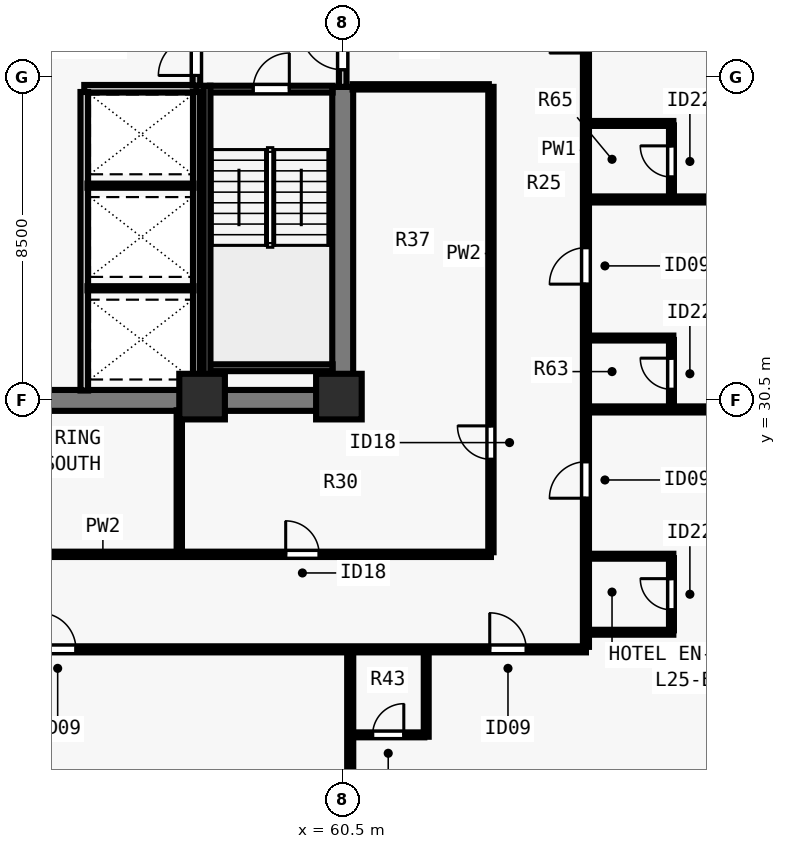
"""IFC4 building model, lengths in metres.
Left out: names, types, materials, properties, quantities, classifications, styles, units other than length and angle.
Written with IfcOpenShell. Run it as: python <this file> out.ifc"""

import sys

from ifc_helpers import new_model, si_unit, direction, frame, frame_2d, origin, origin_2d, place, context, subcontext, project, spatial, rectangle, extrude, element, fill, save


model = new_model("IFC4")
c1 = context("Model", 3, precision=1e-05, world=origin(), true_north=direction((0.0, 1.0)))
c2 = subcontext(c1, "Body", "Model", "MODEL_VIEW")
j1 = project(units=[si_unit("LENGTHUNIT", "METRE"), si_unit("PLANEANGLEUNIT", "RADIAN")], contexts=[c1])
p1 = place(None, origin())
s1 = spatial("IfcSite", under=j1, at=p1, CompositionType="ELEMENT")
p2 = place(p1, origin())
s2 = spatial("IfcBuilding", under=s1, at=p2, CompositionType="ELEMENT")
p3 = place(p2, frame((0.0, 0.0, 93.5)))
s3 = spatial("IfcBuildingStorey", under=s2, at=p3, CompositionType="ELEMENT", Elevation=93.5)
for number, where, z_axis, x_axis in (
    (1, (56.8, 30.6, 0.0), (0.0, 0.0, 1.0), (1.0, 0.0, 0.0)),
    (2, (60.4, 30.6, 0.0), (0.0, 0.0, 1.0), (1.0, 0.0, 0.0)),
):
    element("IfcColumn", number, at=place(p3, frame(where, z_axis=z_axis, x_axis=x_axis)), inside=s3, PredefinedType="COLUMN", context=c2, shape_type="SweptSolid", body=[
        extrude(rectangle(XDim=1.2, YDim=1.2, at=origin_2d()), origin(), (0.0, 0.0, 1.0), 3.5),
    ])
p4 = place(p3, frame((43.225, 30.5, 0.0), z_axis=(0.0, 0.0, 1.0), x_axis=(1.0, 0.0, 0.0)))
e3 = element("IfcWall", 3, at=p4, inside=s3, PredefinedType="SHEAR", context=c2, shape_type="SweptSolid", body=[
    extrude(rectangle(XDim=17.55, YDim=0.55, at=frame_2d((8.775, 0.0))), origin(), (0.0, 0.0, 1.0), 3.24),
])
p5 = place(p3, frame((60.5, 30.765, 0.0), z_axis=(0.0, 0.0, 1.0), x_axis=(0.0, 1.0, 0.0)))
e4 = element("IfcWall", 4, at=p5, inside=s3, PredefinedType="SHEAR", context=c2, shape_type="SweptSolid", body=[
    extrude(rectangle(XDim=7.985, YDim=0.55, at=frame_2d((3.993, 0.0))), origin(), (0.0, 0.0, 1.0), 3.24),
])
p6 = place(p3, frame((53.7, 38.7, 0.0), z_axis=(0.0, 0.0, 1.0), x_axis=(1.0, 0.0, 0.0)))
e5 = element("IfcWall", 5, at=p6, inside=s3, PredefinedType="SOLIDWALL", context=c2, shape_type="SweptSolid", body=[
    extrude(rectangle(XDim=2.95, YDim=0.2, at=frame_2d((1.475, 0.0))), origin(), (0.0, 0.0, 1.0), 3.24),
])
p7 = place(p3, frame((53.7, 30.76, 0.0), z_axis=(0.0, 0.0, 1.0), x_axis=(0.0, 1.0, 0.0)))
e6 = element("IfcWall", 6, at=p7, inside=s3, PredefinedType="SOLIDWALL", context=c2, shape_type="SweptSolid", body=[
    extrude(rectangle(XDim=7.855, YDim=0.2, at=frame_2d((3.927, 0.0))), origin(), (0.0, 0.0, 1.0), 3.24),
])
p8 = place(p3, frame((60.5, 38.75, 0.0), z_axis=(0.0, 0.0, 1.0), x_axis=(0.0, 1.0, 0.0)))
e7 = element("IfcWall", 7, at=p8, inside=s3, PredefinedType="SOLIDWALL", context=c2, shape_type="SweptSolid", body=[
    extrude(rectangle(XDim=2.05, YDim=0.2, at=frame_2d((1.025, 0.0))), origin(), (0.0, 0.0, 1.0), 3.24),
])
p9 = place(p8, frame((0.45, 0.0, 0.0)))
e8 = element("IfcOpeningElement", 8, at=p9, cuts=e7, PredefinedType="OPENING", context=c2, shape_type="SweptSolid", body=[
    extrude(rectangle(XDim=1.1, YDim=2.15, at=frame_2d((0.55, 1.075))), frame((0.0, 0.11, 0.0), z_axis=(0.0, -1.0, 0.0), x_axis=(1.0, 0.0, 0.0)), (0.0, 0.0, 1.0), 0.22),
])
p10 = place(p3, frame((56.65, 38.785, 0.0), z_axis=(0.0, 0.0, 1.0), x_axis=(0.0, 1.0, 0.0)))
e9 = element("IfcWall", 9, at=p10, inside=s3, PredefinedType="SOLIDWALL", context=c2, shape_type="SweptSolid", body=[
    extrude(rectangle(XDim=4.865, YDim=0.2, at=frame_2d((2.433, 0.0))), origin(), (0.0, 0.0, 1.0), 3.24),
])
p11 = place(p10, frame((0.265, 0.0, 0.0)))
e10 = element("IfcOpeningElement", 10, at=p11, cuts=e9, PredefinedType="OPENING", context=c2, shape_type="SweptSolid", body=[
    extrude(rectangle(XDim=1.0, YDim=2.15, at=frame_2d((0.5, 1.075))), frame((0.0, 0.11, 0.0), z_axis=(0.0, -1.0, 0.0), x_axis=(1.0, 0.0, 0.0)), (0.0, 0.0, 1.0), 0.22),
])
p12 = place(p3, frame((56.65, 30.76, 0.0), z_axis=(0.0, 0.0, 1.0), x_axis=(0.0, 1.0, 0.0)))
e11 = element("IfcWall", 11, at=p12, inside=s3, PredefinedType="SOLIDWALL", context=c2, shape_type="SweptSolid", body=[
    extrude(rectangle(XDim=7.855, YDim=0.18, at=frame_2d((3.927, 0.0))), origin(), (0.0, 0.0, 1.0), 3.24),
])
for number, where, z_axis, x_axis in (
    (12, (53.785, 33.45, 0.0), (0.0, 0.0, 1.0), (1.0, 0.0, 0.0)),
    (13, (53.785, 36.15, 0.0), (0.0, 0.0, 1.0), (1.0, 0.0, 0.0)),
):
    element("IfcWall", number, at=place(p3, frame(where, z_axis=z_axis, x_axis=x_axis)), inside=s3, PredefinedType="PARTITIONING", context=c2, shape_type="SweptSolid", body=[
        extrude(rectangle(XDim=2.79, YDim=0.11, at=frame_2d((1.395, 0.0))), origin(), (0.0, 0.0, 1.0), 3.24),
    ])
p13 = place(p3, frame((37.1, 23.95, 0.0), z_axis=(0.0, 0.0, 1.0), x_axis=(1.0, 0.0, 0.0)))
e14 = element("IfcWall", 14, at=p13, inside=s3, PredefinedType="PARTITIONING", context=c2, shape_type="SweptSolid", body=[
    extrude(rectangle(XDim=29.8, YDim=0.16, at=frame_2d((14.9, 0.0))), origin(), (0.0, 0.0, 1.0), 3.24),
])
p14 = place(p13, frame((2.571, 0.0, 0.0)))
e15 = element("IfcOpeningElement", 15, at=p14, cuts=e14, PredefinedType="OPENING", context=c2, shape_type="SweptSolid", body=[
    extrude(rectangle(XDim=0.96, YDim=2.15, at=frame_2d((0.48, 1.075))), frame((0.0, 0.09, 0.0), z_axis=(0.0, -1.0, 0.0), x_axis=(1.0, 0.0, 0.0)), (0.0, 0.0, 1.0), 0.18),
])
p15 = place(p13, frame((15.42, 0.0, 0.0)))
e16 = element("IfcOpeningElement", 16, at=p15, cuts=e14, PredefinedType="OPENING", context=c2, shape_type="SweptSolid", body=[
    extrude(rectangle(XDim=0.96, YDim=2.15, at=frame_2d((0.48, 1.075))), frame((0.0, 0.09, 0.0), z_axis=(0.0, -1.0, 0.0), x_axis=(1.0, 0.0, 0.0)), (0.0, 0.0, 1.0), 0.18),
])
p16 = place(p13, frame((27.269, 0.0, 0.0)))
e17 = element("IfcOpeningElement", 17, at=p16, cuts=e14, PredefinedType="OPENING", context=c2, shape_type="SweptSolid", body=[
    extrude(rectangle(XDim=0.96, YDim=2.15, at=frame_2d((0.48, 1.075))), frame((0.0, 0.09, 0.0), z_axis=(0.0, -1.0, 0.0), x_axis=(1.0, 0.0, 0.0)), (0.0, 0.0, 1.0), 0.18),
])
p17 = place(p3, frame((66.9, 24.015, 0.0), z_axis=(0.0, 0.0, 1.0), x_axis=(0.0, 1.0, 0.0)))
e18 = element("IfcWall", 18, at=p17, inside=s3, PredefinedType="PARTITIONING", context=c2, shape_type="SweptSolid", body=[
    extrude(rectangle(XDim=29.97, YDim=0.16, at=frame_2d((14.985, 0.0))), origin(), (0.0, 0.0, 1.0), 3.24),
])
p18 = place(p17, frame((3.911, 0.0, 0.0)))
e19 = element("IfcOpeningElement", 19, at=p18, cuts=e18, PredefinedType="OPENING", context=c2, shape_type="SweptSolid", body=[
    extrude(rectangle(XDim=0.96, YDim=2.15, at=frame_2d((0.48, 1.075))), frame((0.0, 0.09, 0.0), z_axis=(0.0, -1.0, 0.0), x_axis=(1.0, 0.0, 0.0)), (0.0, 0.0, 1.0), 0.18),
])
p19 = place(p17, frame((9.544, 0.0, 0.0)))
e20 = element("IfcOpeningElement", 20, at=p19, cuts=e18, PredefinedType="OPENING", context=c2, shape_type="SweptSolid", body=[
    extrude(rectangle(XDim=0.96, YDim=2.15, at=frame_2d((0.48, 1.075))), frame((0.0, 0.09, 0.0), z_axis=(0.0, -1.0, 0.0), x_axis=(1.0, 0.0, 0.0)), (0.0, 0.0, 1.0), 0.18),
])
p20 = place(p17, frame((15.625, 0.0, 0.0)))
e21 = element("IfcOpeningElement", 21, at=p20, cuts=e18, PredefinedType="OPENING", context=c2, shape_type="SweptSolid", body=[
    extrude(rectangle(XDim=0.96, YDim=2.15, at=frame_2d((0.48, 1.075))), frame((0.0, 0.09, 0.0), z_axis=(0.0, -1.0, 0.0), x_axis=(1.0, 0.0, 0.0)), (0.0, 0.0, 1.0), 0.18),
])
p21 = place(p17, frame((21.584, 0.0, 0.0)))
e22 = element("IfcOpeningElement", 22, at=p21, cuts=e18, PredefinedType="OPENING", context=c2, shape_type="SweptSolid", body=[
    extrude(rectangle(XDim=0.96, YDim=2.15, at=frame_2d((0.48, 1.075))), frame((0.0, 0.09, 0.0), z_axis=(0.0, -1.0, 0.0), x_axis=(1.0, 0.0, 0.0)), (0.0, 0.0, 1.0), 0.18),
])
p22 = place(p17, frame((27.494, 0.0, 0.0)))
e23 = element("IfcOpeningElement", 23, at=p22, cuts=e18, PredefinedType="OPENING", context=c2, shape_type="SweptSolid", body=[
    extrude(rectangle(XDim=0.96, YDim=2.15, at=frame_2d((0.48, 1.075))), frame((0.0, 0.09, 0.0), z_axis=(0.0, -1.0, 0.0), x_axis=(1.0, 0.0, 0.0)), (0.0, 0.0, 1.0), 0.18),
])
p23 = place(p3, frame((39.6, 26.45, 0.0), z_axis=(0.0, 0.0, 1.0), x_axis=(1.0, 0.0, 0.0)))
e24 = element("IfcWall", 24, at=p23, inside=s3, PredefinedType="PARTITIONING", context=c2, shape_type="SweptSolid", body=[
    extrude(rectangle(XDim=24.8, YDim=0.14, at=frame_2d((12.4, 0.0))), origin(), (0.0, 0.0, 1.0), 3.24),
])
p24 = place(p23, frame((1.2, 0.0, 0.0)))
e25 = element("IfcOpeningElement", 25, at=p24, cuts=e24, PredefinedType="OPENING", context=c2, shape_type="SweptSolid", body=[
    extrude(rectangle(XDim=0.88, YDim=2.1, at=frame_2d((0.44, 1.05))), frame((0.0, 0.08, 0.0), z_axis=(0.0, -1.0, 0.0), x_axis=(1.0, 0.0, 0.0)), (0.0, 0.0, 1.0), 0.16),
])
p25 = place(p23, frame((8.9, 0.0, 0.0)))
e26 = element("IfcOpeningElement", 26, at=p25, cuts=e24, PredefinedType="OPENING", context=c2, shape_type="SweptSolid", body=[
    extrude(rectangle(XDim=0.88, YDim=2.1, at=frame_2d((0.44, 1.05))), frame((0.0, 0.08, 0.0), z_axis=(0.0, -1.0, 0.0), x_axis=(1.0, 0.0, 0.0)), (0.0, 0.0, 1.0), 0.16),
])
p26 = place(p23, frame((19.4, 0.0, 0.0)))
e27 = element("IfcOpeningElement", 27, at=p26, cuts=e24, PredefinedType="OPENING", context=c2, shape_type="SweptSolid", body=[
    extrude(rectangle(XDim=0.88, YDim=2.1, at=frame_2d((0.44, 1.05))), frame((0.0, 0.08, 0.0), z_axis=(0.0, -1.0, 0.0), x_axis=(1.0, 0.0, 0.0)), (0.0, 0.0, 1.0), 0.16),
])
p27 = place(p3, frame((64.4, 26.505, 0.0), z_axis=(0.0, 0.0, 1.0), x_axis=(0.0, 1.0, 0.0)))
e28 = element("IfcWall", 28, at=p27, inside=s3, PredefinedType="PARTITIONING", context=c2, shape_type="SweptSolid", body=[
    extrude(rectangle(XDim=12.245, YDim=0.14, at=frame_2d((6.123, 0.0))), origin(), (0.0, 0.0, 1.0), 3.24),
])
p28 = place(p27, frame((2.445, 0.0, 0.0)))
e29 = element("IfcOpeningElement", 29, at=p28, cuts=e28, PredefinedType="OPENING", context=c2, shape_type="SweptSolid", body=[
    extrude(rectangle(XDim=0.88, YDim=2.1, at=frame_2d((0.44, 1.05))), frame((0.0, 0.08, 0.0), z_axis=(0.0, -1.0, 0.0), x_axis=(1.0, 0.0, 0.0)), (0.0, 0.0, 1.0), 0.16),
])
p29 = place(p3, frame((60.76, 38.75, 0.0), z_axis=(0.0, 0.0, 1.0), x_axis=(1.0, 0.0, 0.0)))
e30 = element("IfcWall", 30, at=p29, inside=s3, PredefinedType="PARTITIONING", context=c2, shape_type="SweptSolid", body=[
    extrude(rectangle(XDim=3.585, YDim=0.14, at=frame_2d((1.792, 0.0))), origin(), (0.0, 0.0, 1.0), 3.24),
])
p30 = place(p3, frame((56.2, 26.505, 0.0), z_axis=(0.0, 0.0, 1.0), x_axis=(0.0, 1.0, 0.0)))
e31 = element("IfcWall", 31, at=p30, inside=s3, PredefinedType="PARTITIONING", context=c2, shape_type="SweptSolid", body=[
    extrude(rectangle(XDim=3.735, YDim=0.14, at=frame_2d((1.868, 0.0))), origin(), (0.0, 0.0, 1.0), 2.809),
])
p31 = place(p3, frame((60.698, 13.845, 0.0), z_axis=(0.0, 0.0, 1.0), x_axis=(0.0, 1.0, 0.0)))
e32 = element("IfcWall", 32, at=p31, inside=s3, PredefinedType="PARTITIONING", context=c2, shape_type="SweptSolid", body=[
    extrude(rectangle(XDim=10.04, YDim=0.16, at=frame_2d((5.02, 0.0))), origin(), (0.0, 0.0, 1.0), 3.24),
])
p32 = place(p3, frame((62.698, 21.65, 0.0), z_axis=(0.0, 0.0, 1.0), x_axis=(0.0, 1.0, 0.0)))
e33 = element("IfcWall", 33, at=p32, inside=s3, PredefinedType="PLUMBINGWALL", context=c2, shape_type="SweptSolid", body=[
    extrude(rectangle(XDim=2.235, YDim=0.13, at=frame_2d((1.118, 0.0))), origin(), (0.0, 0.0, 1.0), 3.24),
])
p33 = place(p3, frame((60.762, 21.7, 0.0), z_axis=(0.0, 0.0, 1.0), x_axis=(1.0, 0.0, 0.0)))
e34 = element("IfcWall", 34, at=p33, inside=s3, PredefinedType="PLUMBINGWALL", context=c2, shape_type="SweptSolid", body=[
    extrude(rectangle(XDim=1.885, YDim=0.13, at=frame_2d((0.942, 0.0))), origin(), (0.0, 0.0, 1.0), 3.24),
])
p34 = place(p33, frame((0.525, 0.0, 0.0)))
e35 = element("IfcOpeningElement", 35, at=p34, cuts=e34, PredefinedType="OPENING", context=c2, shape_type="SweptSolid", body=[
    extrude(rectangle(XDim=0.82, YDim=2.1, at=frame_2d((0.41, 1.05))), frame((0.0, 0.075, 0.0), z_axis=(0.0, -1.0, 0.0), x_axis=(1.0, 0.0, 0.0)), (0.0, 0.0, 1.0), 0.15),
])
p35 = place(p3, frame((66.965, 24.4, 0.0), z_axis=(0.0, 0.0, 1.0), x_axis=(1.0, 0.0, 0.0)))
e36 = element("IfcWall", 36, at=p35, inside=s3, PredefinedType="PLUMBINGWALL", context=c2, shape_type="SweptSolid", body=[
    extrude(rectangle(XDim=2.235, YDim=0.13, at=frame_2d((1.117, 0.0))), origin(), (0.0, 0.0, 1.0), 2.809),
])
p36 = place(p3, frame((66.965, 26.4, 0.0), z_axis=(0.0, 0.0, 1.0), x_axis=(1.0, 0.0, 0.0)))
e37 = element("IfcWall", 37, at=p36, inside=s3, PredefinedType="PLUMBINGWALL", context=c2, shape_type="SweptSolid", body=[
    extrude(rectangle(XDim=2.235, YDim=0.13, at=frame_2d((1.117, 0.0))), origin(), (0.0, 0.0, 1.0), 3.24),
])
p37 = place(p3, frame((69.15, 24.45, 0.0), z_axis=(0.0, 0.0, 1.0), x_axis=(0.0, 1.0, 0.0)))
e38 = element("IfcWall", 38, at=p37, inside=s3, PredefinedType="PLUMBINGWALL", context=c2, shape_type="SweptSolid", body=[
    extrude(rectangle(XDim=1.9, YDim=0.13, at=frame_2d((0.95, 0.0))), origin(), (0.0, 0.0, 1.0), 3.24),
])
p38 = place(p37, frame((0.54, 0.0, 0.0)))
e39 = element("IfcOpeningElement", 39, at=p38, cuts=e38, PredefinedType="OPENING", context=c2, shape_type="SweptSolid", body=[
    extrude(rectangle(XDim=0.82, YDim=2.1, at=frame_2d((0.41, 1.05))), frame((0.0, 0.075, 0.0), z_axis=(0.0, -1.0, 0.0), x_axis=(1.0, 0.0, 0.0)), (0.0, 0.0, 1.0), 0.15),
])
p39 = place(p3, frame((66.965, 30.262, 0.0), z_axis=(0.0, 0.0, 1.0), x_axis=(1.0, 0.0, 0.0)))
e40 = element("IfcWall", 40, at=p39, inside=s3, PredefinedType="PARTITIONING", context=c2, shape_type="SweptSolid", body=[
    extrude(rectangle(XDim=10.19, YDim=0.16, at=frame_2d((5.095, 0.0))), origin(), (0.0, 0.0, 1.0), 3.24),
])
p40 = place(p3, frame((66.965, 32.141, 0.0), z_axis=(0.0, 0.0, 1.0), x_axis=(1.0, 0.0, 0.0)))
e41 = element("IfcWall", 41, at=p40, inside=s3, PredefinedType="PLUMBINGWALL", context=c2, shape_type="SweptSolid", body=[
    extrude(rectangle(XDim=2.235, YDim=0.13, at=frame_2d((1.117, 0.0))), origin(), (0.0, 0.0, 1.0), 2.399),
])
p41 = place(p3, frame((69.15, 30.327, 0.0), z_axis=(0.0, 0.0, 1.0), x_axis=(0.0, 1.0, 0.0)))
e42 = element("IfcWall", 42, at=p41, inside=s3, PredefinedType="PLUMBINGWALL", context=c2, shape_type="SweptSolid", body=[
    extrude(rectangle(XDim=1.764, YDim=0.13, at=frame_2d((0.882, 0.0))), origin(), (0.0, 0.0, 1.0), 3.24),
])
p42 = place(p41, frame((0.464, 0.0, 0.0)))
e43 = element("IfcOpeningElement", 43, at=p42, cuts=e42, PredefinedType="OPENING", context=c2, shape_type="SweptSolid", body=[
    extrude(rectangle(XDim=0.82, YDim=2.1, at=frame_2d((0.41, 1.05))), frame((0.0, 0.075, 0.0), z_axis=(0.0, -1.0, 0.0), x_axis=(1.0, 0.0, 0.0)), (0.0, 0.0, 1.0), 0.15),
])
p43 = place(p3, frame((66.965, 35.788, 0.0), z_axis=(0.0, 0.0, 1.0), x_axis=(1.0, 0.0, 0.0)))
e44 = element("IfcWall", 44, at=p43, inside=s3, PredefinedType="PARTITIONING", context=c2, shape_type="SweptSolid", body=[
    extrude(rectangle(XDim=10.19, YDim=0.16, at=frame_2d((5.095, 0.0))), origin(), (0.0, 0.0, 1.0), 3.24),
])
p44 = place(p3, frame((66.965, 37.788, 0.0), z_axis=(0.0, 0.0, 1.0), x_axis=(1.0, 0.0, 0.0)))
e45 = element("IfcWall", 45, at=p44, inside=s3, PredefinedType="PLUMBINGWALL", context=c2, shape_type="SweptSolid", body=[
    extrude(rectangle(XDim=2.235, YDim=0.13, at=frame_2d((1.117, 0.0))), origin(), (0.0, 0.0, 1.0), 3.24),
])
p45 = place(p3, frame((69.15, 35.853, 0.0), z_axis=(0.0, 0.0, 1.0), x_axis=(0.0, 1.0, 0.0)))
e46 = element("IfcWall", 46, at=p45, inside=s3, PredefinedType="PLUMBINGWALL", context=c2, shape_type="SweptSolid", body=[
    extrude(rectangle(XDim=1.885, YDim=0.13, at=frame_2d((0.942, 0.0))), origin(), (0.0, 0.0, 1.0), 3.24),
])
p46 = place(p45, frame((0.525, 0.0, 0.0)))
e47 = element("IfcOpeningElement", 47, at=p46, cuts=e46, PredefinedType="OPENING", context=c2, shape_type="SweptSolid", body=[
    extrude(rectangle(XDim=0.82, YDim=2.1, at=frame_2d((0.41, 1.05))), frame((0.0, 0.075, 0.0), z_axis=(0.0, -1.0, 0.0), x_axis=(1.0, 0.0, 0.0)), (0.0, 0.0, 1.0), 0.15),
])
p47 = place(p3, frame((57.005, 38.69, 0.0), z_axis=(0.0, 0.0, 1.0), x_axis=(1.0, 0.0, 0.0)))
e48 = element("IfcWall", 48, at=p47, inside=s3, PredefinedType="SOLIDWALL", context=c2, shape_type="SweptSolid", body=[
    extrude(rectangle(XDim=3.23, YDim=0.18, at=frame_2d((1.615, 0.0))), origin(), (0.0, 0.0, 1.0), 3.24),
])
p48 = place(p47, frame((1.14, 0.0, 0.0)))
e49 = element("IfcOpeningElement", 49, at=p48, cuts=e48, PredefinedType="OPENING", context=c2, shape_type="SweptSolid", body=[
    extrude(rectangle(XDim=0.95, YDim=2.15, at=frame_2d((0.475, 1.075))), frame((0.0, 0.1, 0.0), z_axis=(0.0, -1.0, 0.0), x_axis=(1.0, 0.0, 0.0)), (0.0, 0.0, 1.0), 0.2),
])
p49 = place(p3, frame((57.005, 31.36, 0.0), z_axis=(0.0, 0.0, 1.0), x_axis=(1.0, 0.0, 0.0)))
e50 = element("IfcWall", 50, at=p49, inside=s3, PredefinedType="SOLIDWALL", context=c2, shape_type="SweptSolid", body=[
    extrude(rectangle(XDim=3.23, YDim=0.18, at=frame_2d((1.615, 0.0))), origin(), (0.0, 0.0, 1.0), 3.24),
])
p50 = place(p3, frame((56.93, 38.78, 0.0), z_axis=(0.0, 0.0, 1.0), x_axis=(0.0, -1.0, 0.0)))
e51 = element("IfcWall", 51, at=p50, inside=s3, PredefinedType="SOLIDWALL", context=c2, shape_type="SweptSolid", body=[
    extrude(rectangle(XDim=8.017, YDim=0.18, at=frame_2d((4.009, 0.0))), origin(), (0.0, 0.0, 1.0), 3.24),
])
p51 = place(p9, origin())
e52 = element("IfcDoor", 52, at=p51, inside=s3, OperationType="SINGLE_SWING_RIGHT", PredefinedType="DOOR", context=c2, shape_type="SweptSolid", body=[
    extrude(rectangle(XDim=1.1, YDim=2.15, at=frame_2d((0.55, 1.075))), frame((0.0, 0.025, 0.0), z_axis=(0.0, -1.0, 0.0), x_axis=(1.0, 0.0, 0.0)), (0.0, 0.0, 1.0), 0.05),
])
fill(e8, e52)
p52 = place(p11, origin())
e53 = element("IfcDoor", 53, at=p52, inside=s3, OperationType="SINGLE_SWING_LEFT", PredefinedType="DOOR", context=c2, shape_type="SweptSolid", body=[
    extrude(rectangle(XDim=1.0, YDim=2.15, at=frame_2d((0.5, 1.075))), frame((0.0, 0.025, 0.0), z_axis=(0.0, -1.0, 0.0), x_axis=(1.0, 0.0, 0.0)), (0.0, 0.0, 1.0), 0.05),
])
fill(e10, e53)
p53 = place(p26, origin())
e54 = element("IfcDoor", 54, at=p53, inside=s3, OperationType="SINGLE_SWING_LEFT", PredefinedType="DOOR", context=c2, shape_type="SweptSolid", body=[
    extrude(rectangle(XDim=0.88, YDim=2.1, at=frame_2d((0.44, 1.05))), frame((0.0, 0.025, 0.0), z_axis=(0.0, -1.0, 0.0), x_axis=(1.0, 0.0, 0.0)), (0.0, 0.0, 1.0), 0.05),
])
fill(e27, e54)
p54 = place(p28, origin())
e55 = element("IfcDoor", 55, at=p54, inside=s3, OperationType="SINGLE_SWING_RIGHT", PredefinedType="DOOR", context=c2, shape_type="SweptSolid", body=[
    extrude(rectangle(XDim=0.88, YDim=2.1, at=frame_2d((0.44, 1.05))), frame((0.0, 0.025, 0.0), z_axis=(0.0, -1.0, 0.0), x_axis=(1.0, 0.0, 0.0)), (0.0, 0.0, 1.0), 0.05),
])
fill(e29, e55)
p55 = place(p15, origin())
e56 = element("IfcDoor", 56, at=p55, inside=s3, OperationType="SINGLE_SWING_LEFT", PredefinedType="DOOR", context=c2, shape_type="SweptSolid", body=[
    extrude(rectangle(XDim=0.96, YDim=2.15, at=frame_2d((0.48, 1.075))), frame((0.0, 0.025, 0.0), z_axis=(0.0, -1.0, 0.0), x_axis=(1.0, 0.0, 0.0)), (0.0, 0.0, 1.0), 0.05),
])
fill(e16, e56)
p56 = place(p34, origin())
e57 = element("IfcDoor", 57, at=p56, inside=s3, OperationType="SINGLE_SWING_RIGHT", PredefinedType="DOOR", context=c2, shape_type="SweptSolid", body=[
    extrude(rectangle(XDim=0.82, YDim=2.1, at=frame_2d((0.41, 1.05))), frame((0.0, 0.025, 0.0), z_axis=(0.0, -1.0, 0.0), x_axis=(1.0, 0.0, 0.0)), (0.0, 0.0, 1.0), 0.05),
])
fill(e35, e57)
p57 = place(p16, origin())
e58 = element("IfcDoor", 58, at=p57, inside=s3, OperationType="SINGLE_SWING_LEFT", PredefinedType="DOOR", context=c2, shape_type="SweptSolid", body=[
    extrude(rectangle(XDim=0.96, YDim=2.15, at=frame_2d((0.48, 1.075))), frame((0.0, 0.025, 0.0), z_axis=(0.0, -1.0, 0.0), x_axis=(1.0, 0.0, 0.0)), (0.0, 0.0, 1.0), 0.05),
])
fill(e17, e58)
p58 = place(p38, origin())
e59 = element("IfcDoor", 59, at=p58, inside=s3, OperationType="SINGLE_SWING_RIGHT", PredefinedType="DOOR", context=c2, shape_type="SweptSolid", body=[
    extrude(rectangle(XDim=0.82, YDim=2.1, at=frame_2d((0.41, 1.05))), frame((0.0, 0.025, 0.0), z_axis=(0.0, -1.0, 0.0), x_axis=(1.0, 0.0, 0.0)), (0.0, 0.0, 1.0), 0.05),
])
fill(e39, e59)
p59 = place(p18, origin())
e60 = element("IfcDoor", 60, at=p59, inside=s3, OperationType="SINGLE_SWING_LEFT", PredefinedType="DOOR", context=c2, shape_type="SweptSolid", body=[
    extrude(rectangle(XDim=0.96, YDim=2.15, at=frame_2d((0.48, 1.075))), frame((0.0, 0.025, 0.0), z_axis=(0.0, -1.0, 0.0), x_axis=(1.0, 0.0, 0.0)), (0.0, 0.0, 1.0), 0.05),
])
fill(e19, e60)
p60 = place(p42, origin())
e61 = element("IfcDoor", 61, at=p60, inside=s3, OperationType="SINGLE_SWING_RIGHT", PredefinedType="DOOR", context=c2, shape_type="SweptSolid", body=[
    extrude(rectangle(XDim=0.82, YDim=2.1, at=frame_2d((0.41, 1.05))), frame((0.0, 0.025, 0.0), z_axis=(0.0, -1.0, 0.0), x_axis=(1.0, 0.0, 0.0)), (0.0, 0.0, 1.0), 0.05),
])
fill(e43, e61)
p61 = place(p19, origin())
e62 = element("IfcDoor", 62, at=p61, inside=s3, OperationType="SINGLE_SWING_LEFT", PredefinedType="DOOR", context=c2, shape_type="SweptSolid", body=[
    extrude(rectangle(XDim=0.96, YDim=2.15, at=frame_2d((0.48, 1.075))), frame((0.0, 0.025, 0.0), z_axis=(0.0, -1.0, 0.0), x_axis=(1.0, 0.0, 0.0)), (0.0, 0.0, 1.0), 0.05),
])
fill(e20, e62)
p62 = place(p46, origin())
e63 = element("IfcDoor", 63, at=p62, inside=s3, OperationType="SINGLE_SWING_RIGHT", PredefinedType="DOOR", context=c2, shape_type="SweptSolid", body=[
    extrude(rectangle(XDim=0.82, YDim=2.1, at=frame_2d((0.41, 1.05))), frame((0.0, 0.025, 0.0), z_axis=(0.0, -1.0, 0.0), x_axis=(1.0, 0.0, 0.0)), (0.0, 0.0, 1.0), 0.05),
])
fill(e47, e63)
p63 = place(p20, origin())
e64 = element("IfcDoor", 64, at=p63, inside=s3, OperationType="SINGLE_SWING_LEFT", PredefinedType="DOOR", context=c2, shape_type="SweptSolid", body=[
    extrude(rectangle(XDim=0.96, YDim=2.15, at=frame_2d((0.48, 1.075))), frame((0.0, 0.025, 0.0), z_axis=(0.0, -1.0, 0.0), x_axis=(1.0, 0.0, 0.0)), (0.0, 0.0, 1.0), 0.05),
])
fill(e21, e64)
p64 = place(p48, origin())
e65 = element("IfcDoor", 65, at=p64, inside=s3, OperationType="SINGLE_SWING_RIGHT", PredefinedType="DOOR", context=c2, shape_type="SweptSolid", body=[
    extrude(rectangle(XDim=0.95, YDim=2.15, at=frame_2d((0.475, 1.075))), frame((0.0, 0.025, 0.0), z_axis=(0.0, -1.0, 0.0), x_axis=(1.0, 0.0, 0.0)), (0.0, 0.0, 1.0), 0.05),
])
fill(e49, e65)
save(model, sys.argv[1])
